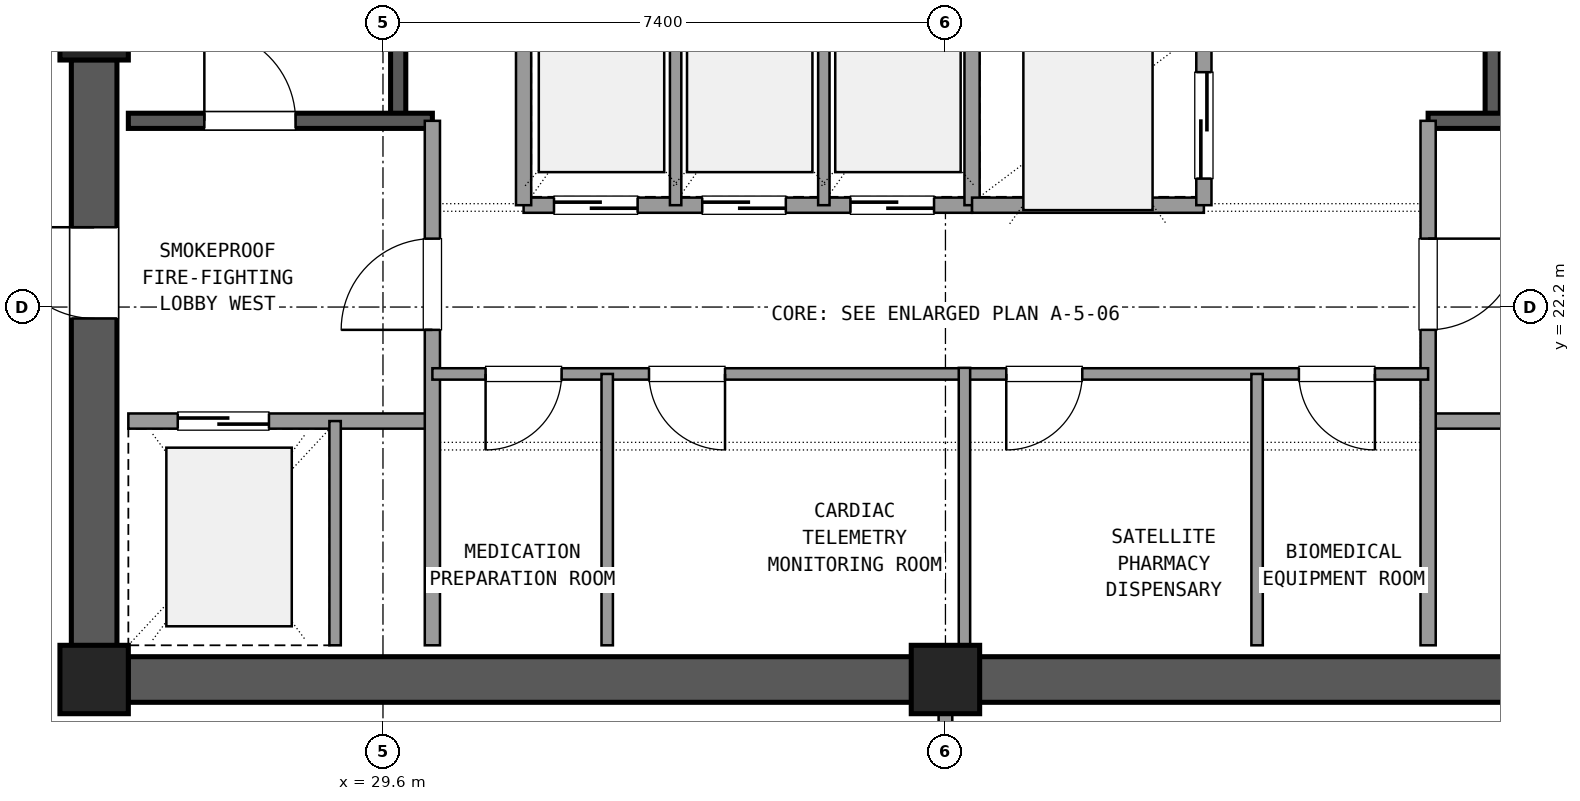
"""IFC4 building model, lengths in metres.
Left out: names, types, materials, properties, quantities, classifications, styles, units other than length and angle.
Written with IfcOpenShell. Run it as: python <this file> out.ifc"""

import sys

from ifc_helpers import new_model, si_unit, direction, frame, frame_2d, origin, origin_2d, place, context, subcontext, project, spatial, rectangle, extrude, element, fill, save


model = new_model("IFC4")
c1 = context("Model", 3, precision=1e-05, world=origin(), true_north=direction((0.0, 1.0)))
c2 = subcontext(c1, "Body", "Model", "MODEL_VIEW")
j1 = project(units=[si_unit("LENGTHUNIT", "METRE"), si_unit("PLANEANGLEUNIT", "RADIAN")], contexts=[c1])
p1 = place(None, origin())
s1 = spatial("IfcSite", under=j1, at=p1, CompositionType="ELEMENT")
p2 = place(p1, origin())
s2 = spatial("IfcBuilding", under=s1, at=p2, CompositionType="ELEMENT")
p3 = place(p2, frame((0.0, 0.0, 253.62)))
s3 = spatial("IfcBuildingStorey", under=s2, at=p3, CompositionType="ELEMENT", Elevation=253.62)
for number, where, z_axis, x_axis in (
    (1, (25.8, 17.3, 0.0), (0.0, 0.0, 1.0), (1.0, 0.0, 0.0)),
    (2, (37.0, 17.3, 0.0), (0.0, 0.0, 1.0), (1.0, 0.0, 0.0)),
    (3, (25.8, 25.9, 0.0), (0.0, 0.0, 1.0), (1.0, 0.0, 0.0)),
):
    element("IfcColumn", number, at=place(p3, frame(where, z_axis=z_axis, x_axis=x_axis)), inside=s3, PredefinedType="COLUMN", context=c2, shape_type="SweptSolid", body=[
        extrude(rectangle(XDim=0.9, YDim=0.9, at=origin_2d()), origin(), (0.0, 0.0, 1.0), 3.6),
    ])
for number, where, z_axis, x_axis in (
    (4, (26.245, 17.3, 0.0), (0.0, 0.0, 1.0), (1.0, 0.0, 0.0)),
    (5, (37.445, 17.3, 0.0), (0.0, 0.0, 1.0), (1.0, 0.0, 0.0)),
):
    element("IfcWall", number, at=place(p3, frame(where, z_axis=z_axis, x_axis=x_axis)), inside=s3, PredefinedType="SHEAR", context=c2, shape_type="SweptSolid", body=[
        extrude(rectangle(XDim=10.31, YDim=0.6, at=frame_2d((5.155, 0.0))), origin(), (0.0, 0.0, 1.0), 3.32),
    ])
p4 = place(p3, frame((25.8, 25.455, 0.0), z_axis=(0.0, 0.0, 1.0), x_axis=(0.0, -1.0, 0.0)))
e6 = element("IfcWall", 6, at=p4, inside=s3, PredefinedType="SHEAR", context=c2, shape_type="SweptSolid", body=[
    extrude(rectangle(XDim=7.71, YDim=0.6, at=frame_2d((3.855, 0.0))), origin(), (0.0, 0.0, 1.0), 3.32),
])
p5 = place(p4, frame((2.205, 0.0, 0.0)))
e7 = element("IfcOpeningElement", 7, at=p5, cuts=e6, PredefinedType="OPENING", context=c2, shape_type="SweptSolid", body=[
    extrude(rectangle(XDim=1.2, YDim=2.15, at=frame_2d((0.6, 1.075))), frame((0.0, 0.31, 0.0), z_axis=(0.0, -1.0, 0.0), x_axis=(1.0, 0.0, 0.0)), (0.0, 0.0, 1.0), 0.62),
])
p6 = place(p3, frame((29.8, 24.65, 0.0), z_axis=(0.0, 0.0, 1.0), x_axis=(0.0, 1.0, 0.0)))
e8 = element("IfcWall", 8, at=p6, inside=s3, PredefinedType="SHEAR", context=c2, shape_type="SweptSolid", body=[
    extrude(rectangle(XDim=9.4, YDim=0.2, at=frame_2d((4.7, 0.0))), origin(), (0.0, 0.0, 1.0), 3.32),
])
p7 = place(p3, frame((26.25, 24.65, 0.0), z_axis=(0.0, 0.0, 1.0), x_axis=(1.0, 0.0, 0.0)))
e9 = element("IfcWall", 9, at=p7, inside=s3, PredefinedType="SHEAR", context=c2, shape_type="SweptSolid", body=[
    extrude(rectangle(XDim=4.0, YDim=0.2, at=frame_2d((2.0, 0.0))), origin(), (0.0, 0.0, 1.0), 3.32),
])
p8 = place(p7, frame((1.0, 0.0, 0.0)))
e10 = element("IfcOpeningElement", 10, at=p8, cuts=e9, PredefinedType="OPENING", context=c2, shape_type="SweptSolid", body=[
    extrude(rectangle(XDim=1.2, YDim=2.15, at=frame_2d((0.6, 1.075))), frame((0.0, 0.11, 0.0), z_axis=(0.0, -1.0, 0.0), x_axis=(1.0, 0.0, 0.0)), (0.0, 0.0, 1.0), 0.22),
])
p9 = place(p3, frame((44.2, 24.65, 0.0), z_axis=(0.0, 0.0, 1.0), x_axis=(0.0, 1.0, 0.0)))
e11 = element("IfcWall", 11, at=p9, inside=s3, PredefinedType="SHEAR", context=c2, shape_type="SweptSolid", body=[
    extrude(rectangle(XDim=9.4, YDim=0.2, at=frame_2d((4.7, 0.0))), origin(), (0.0, 0.0, 1.0), 3.32),
])
p10 = place(p3, frame((43.35, 24.65, 0.0), z_axis=(0.0, 0.0, 1.0), x_axis=(1.0, 0.0, 0.0)))
e12 = element("IfcWall", 12, at=p10, inside=s3, PredefinedType="SHEAR", context=c2, shape_type="SweptSolid", body=[
    extrude(rectangle(XDim=4.4, YDim=0.2, at=frame_2d((2.2, 0.0))), origin(), (0.0, 0.0, 1.0), 3.32),
])
p11 = place(p10, frame((2.0, 0.0, 0.0)))
e13 = element("IfcOpeningElement", 13, at=p11, cuts=e12, PredefinedType="OPENING", context=c2, shape_type="SweptSolid", body=[
    extrude(rectangle(XDim=1.2, YDim=2.15, at=frame_2d((0.6, 1.075))), frame((0.0, 0.11, 0.0), z_axis=(0.0, -1.0, 0.0), x_axis=(1.0, 0.0, 0.0)), (0.0, 0.0, 1.0), 0.22),
])
p12 = place(p3, frame((26.25, 20.7, 0.0), z_axis=(0.0, 0.0, 1.0), x_axis=(1.0, 0.0, 0.0)))
e14 = element("IfcWall", 14, at=p12, inside=s3, PredefinedType="SOLIDWALL", context=c2, shape_type="SweptSolid", body=[
    extrude(rectangle(XDim=4.0, YDim=0.2, at=frame_2d((2.0, 0.0))), origin(), (0.0, 0.0, 1.0), 2.61),
])
p13 = place(p12, frame((0.65, 0.0, 0.0)))
e15 = element("IfcOpeningElement", 15, at=p13, cuts=e14, PredefinedType="OPENING", context=c2, shape_type="SweptSolid", body=[
    extrude(rectangle(XDim=1.2, YDim=2.15, at=frame_2d((0.6, 1.075))), frame((0.0, 0.11, 0.0), z_axis=(0.0, -1.0, 0.0), x_axis=(1.0, 0.0, 0.0)), (0.0, 0.0, 1.0), 0.22),
])
p14 = place(p3, frame((30.25, 17.75, 0.0), z_axis=(0.0, 0.0, 1.0), x_axis=(0.0, 1.0, 0.0)))
e16 = element("IfcWall", 16, at=p14, inside=s3, PredefinedType="SOLIDWALL", context=c2, shape_type="SweptSolid", body=[
    extrude(rectangle(XDim=6.9, YDim=0.2, at=frame_2d((3.45, 0.0))), origin(), (0.0, 0.0, 1.0), 2.61),
])
p15 = place(p14, frame((4.15, 0.0, 0.0)))
e17 = element("IfcOpeningElement", 17, at=p15, cuts=e16, PredefinedType="OPENING", context=c2, shape_type="SweptSolid", body=[
    extrude(rectangle(XDim=1.2, YDim=2.15, at=frame_2d((0.6, 1.075))), frame((0.0, 0.11, 0.0), z_axis=(0.0, -1.0, 0.0), x_axis=(1.0, 0.0, 0.0)), (0.0, 0.0, 1.0), 0.22),
])
p16 = place(p3, frame((28.97, 17.75, 0.0), z_axis=(0.0, 0.0, 1.0), x_axis=(0.0, 1.0, 0.0)))
e18 = element("IfcWall", 18, at=p16, inside=s3, PredefinedType="PARTITIONING", context=c2, shape_type="SweptSolid", body=[
    extrude(rectangle(XDim=2.95, YDim=0.15, at=frame_2d((1.475, 0.0))), origin(), (0.0, 0.0, 1.0), 2.61),
])
p17 = place(p3, frame((43.35, 20.7, 0.0), z_axis=(0.0, 0.0, 1.0), x_axis=(1.0, 0.0, 0.0)))
e19 = element("IfcWall", 19, at=p17, inside=s3, PredefinedType="SOLIDWALL", context=c2, shape_type="SweptSolid", body=[
    extrude(rectangle(XDim=4.4, YDim=0.2, at=frame_2d((2.2, 0.0))), origin(), (0.0, 0.0, 1.0), 2.61),
])
p18 = place(p17, frame((2.35, 0.0, 0.0)))
e20 = element("IfcOpeningElement", 20, at=p18, cuts=e19, PredefinedType="OPENING", context=c2, shape_type="SweptSolid", body=[
    extrude(rectangle(XDim=1.2, YDim=2.15, at=frame_2d((0.6, 1.075))), frame((0.0, 0.11, 0.0), z_axis=(0.0, -1.0, 0.0), x_axis=(1.0, 0.0, 0.0)), (0.0, 0.0, 1.0), 0.22),
])
p19 = place(p3, frame((43.35, 17.75, 0.0), z_axis=(0.0, 0.0, 1.0), x_axis=(0.0, 1.0, 0.0)))
e21 = element("IfcWall", 21, at=p19, inside=s3, PredefinedType="SOLIDWALL", context=c2, shape_type="SweptSolid", body=[
    extrude(rectangle(XDim=6.9, YDim=0.2, at=frame_2d((3.45, 0.0))), origin(), (0.0, 0.0, 1.0), 2.61),
])
p20 = place(p19, frame((4.15, 0.0, 0.0)))
e22 = element("IfcOpeningElement", 22, at=p20, cuts=e21, PredefinedType="OPENING", context=c2, shape_type="SweptSolid", body=[
    extrude(rectangle(XDim=1.2, YDim=2.15, at=frame_2d((0.6, 1.075))), frame((0.0, 0.11, 0.0), z_axis=(0.0, -1.0, 0.0), x_axis=(1.0, 0.0, 0.0)), (0.0, 0.0, 1.0), 0.22),
])
p21 = place(p3, frame((30.25, 21.32, 0.0), z_axis=(0.0, 0.0, 1.0), x_axis=(1.0, 0.0, 0.0)))
e23 = element("IfcWall", 23, at=p21, inside=s3, PredefinedType="PARTITIONING", context=c2, shape_type="SweptSolid", body=[
    extrude(rectangle(XDim=7.0, YDim=0.15, at=frame_2d((3.5, 0.0))), origin(), (0.0, 0.0, 1.0), 2.61),
])
p22 = place(p21, frame((0.7, 0.0, 0.0)))
e24 = element("IfcOpeningElement", 24, at=p22, cuts=e23, PredefinedType="OPENING", context=c2, shape_type="SweptSolid", body=[
    extrude(rectangle(XDim=1.0, YDim=2.15, at=frame_2d((0.5, 1.075))), frame((0.0, 0.085, 0.0), z_axis=(0.0, -1.0, 0.0), x_axis=(1.0, 0.0, 0.0)), (0.0, 0.0, 1.0), 0.17),
])
p23 = place(p21, frame((2.85, 0.0, 0.0)))
e25 = element("IfcOpeningElement", 25, at=p23, cuts=e23, PredefinedType="OPENING", context=c2, shape_type="SweptSolid", body=[
    extrude(rectangle(XDim=1.0, YDim=2.15, at=frame_2d((0.5, 1.075))), frame((0.0, 0.085, 0.0), z_axis=(0.0, -1.0, 0.0), x_axis=(1.0, 0.0, 0.0)), (0.0, 0.0, 1.0), 0.17),
])
p24 = place(p3, frame((32.55, 17.75, 0.0), z_axis=(0.0, 0.0, 1.0), x_axis=(0.0, 1.0, 0.0)))
e26 = element("IfcWall", 26, at=p24, inside=s3, PredefinedType="PARTITIONING", context=c2, shape_type="SweptSolid", body=[
    extrude(rectangle(XDim=3.57, YDim=0.15, at=frame_2d((1.785, 0.0))), origin(), (0.0, 0.0, 1.0), 2.61),
])
p25 = place(p3, frame((37.25, 21.32, 0.0), z_axis=(0.0, 0.0, 1.0), x_axis=(1.0, 0.0, 0.0)))
e27 = element("IfcWall", 27, at=p25, inside=s3, PredefinedType="PARTITIONING", context=c2, shape_type="SweptSolid", body=[
    extrude(rectangle(XDim=6.1, YDim=0.15, at=frame_2d((3.05, 0.0))), origin(), (0.0, 0.0, 1.0), 2.61),
])
p26 = place(p25, frame((0.55, 0.0, 0.0)))
e28 = element("IfcOpeningElement", 28, at=p26, cuts=e27, PredefinedType="OPENING", context=c2, shape_type="SweptSolid", body=[
    extrude(rectangle(XDim=1.0, YDim=2.15, at=frame_2d((0.5, 1.075))), frame((0.0, 0.085, 0.0), z_axis=(0.0, -1.0, 0.0), x_axis=(1.0, 0.0, 0.0)), (0.0, 0.0, 1.0), 0.17),
])
p27 = place(p25, frame((4.4, 0.0, 0.0)))
e29 = element("IfcOpeningElement", 29, at=p27, cuts=e27, PredefinedType="OPENING", context=c2, shape_type="SweptSolid", body=[
    extrude(rectangle(XDim=1.0, YDim=2.15, at=frame_2d((0.5, 1.075))), frame((0.0, 0.085, 0.0), z_axis=(0.0, -1.0, 0.0), x_axis=(1.0, 0.0, 0.0)), (0.0, 0.0, 1.0), 0.17),
])
p28 = place(p3, frame((41.1, 17.75, 0.0), z_axis=(0.0, 0.0, 1.0), x_axis=(0.0, 1.0, 0.0)))
e30 = element("IfcWall", 30, at=p28, inside=s3, PredefinedType="PARTITIONING", context=c2, shape_type="SweptSolid", body=[
    extrude(rectangle(XDim=3.57, YDim=0.15, at=frame_2d((1.785, 0.0))), origin(), (0.0, 0.0, 1.0), 2.61),
])
p29 = place(p3, frame((37.25, 17.75, 0.0), z_axis=(0.0, 0.0, 1.0), x_axis=(0.0, 1.0, 0.0)))
e31 = element("IfcWall", 31, at=p29, inside=s3, PredefinedType="PARTITIONING", context=c2, shape_type="SweptSolid", body=[
    extrude(rectangle(XDim=3.65, YDim=0.15, at=frame_2d((1.825, 0.0))), origin(), (0.0, 0.0, 1.0), 2.61),
])
p30 = place(p3, frame((31.45, 23.54, 0.0), z_axis=(0.0, 0.0, 1.0), x_axis=(1.0, 0.0, 0.0)))
e32 = element("IfcWall", 32, at=p30, inside=s3, PredefinedType="SOLIDWALL", context=c2, shape_type="SweptSolid", body=[
    extrude(rectangle(XDim=5.9, YDim=0.2, at=frame_2d((2.95, 0.0))), origin(), (0.0, 0.0, 1.0), 2.61),
])
p31 = place(p30, frame((0.4, 0.0, 0.0)))
e33 = element("IfcOpeningElement", 33, at=p31, cuts=e32, PredefinedType="OPENING", context=c2, shape_type="SweptSolid", body=[
    extrude(rectangle(XDim=1.1, YDim=2.15, at=frame_2d((0.55, 1.075))), frame((0.0, 0.11, 0.0), z_axis=(0.0, -1.0, 0.0), x_axis=(1.0, 0.0, 0.0)), (0.0, 0.0, 1.0), 0.22),
])
p32 = place(p30, frame((2.35, 0.0, 0.0)))
e34 = element("IfcOpeningElement", 34, at=p32, cuts=e32, PredefinedType="OPENING", context=c2, shape_type="SweptSolid", body=[
    extrude(rectangle(XDim=1.1, YDim=2.15, at=frame_2d((0.55, 1.075))), frame((0.0, 0.11, 0.0), z_axis=(0.0, -1.0, 0.0), x_axis=(1.0, 0.0, 0.0)), (0.0, 0.0, 1.0), 0.22),
])
p33 = place(p30, frame((4.3, 0.0, 0.0)))
e35 = element("IfcOpeningElement", 35, at=p33, cuts=e32, PredefinedType="OPENING", context=c2, shape_type="SweptSolid", body=[
    extrude(rectangle(XDim=1.1, YDim=2.15, at=frame_2d((0.55, 1.075))), frame((0.0, 0.11, 0.0), z_axis=(0.0, -1.0, 0.0), x_axis=(1.0, 0.0, 0.0)), (0.0, 0.0, 1.0), 0.22),
])
p34 = place(p3, frame((31.45, 23.54, 0.0), z_axis=(0.0, 0.0, 1.0), x_axis=(0.0, 1.0, 0.0)))
e36 = element("IfcWall", 36, at=p34, inside=s3, PredefinedType="SOLIDWALL", context=c2, shape_type="SweptSolid", body=[
    extrude(rectangle(XDim=2.81, YDim=0.2, at=frame_2d((1.405, 0.0))), origin(), (0.0, 0.0, 1.0), 2.61),
])
for number, where, z_axis, x_axis in (
    (37, (33.45, 23.54, 0.0), (0.0, 0.0, 1.0), (0.0, 1.0, 0.0)),
    (38, (35.4, 23.54, 0.0), (0.0, 0.0, 1.0), (0.0, 1.0, 0.0)),
):
    element("IfcWall", number, at=place(p3, frame(where, z_axis=z_axis, x_axis=x_axis)), inside=s3, PredefinedType="PARTITIONING", context=c2, shape_type="SweptSolid", body=[
        extrude(rectangle(XDim=2.81, YDim=0.15, at=frame_2d((1.405, 0.0))), origin(), (0.0, 0.0, 1.0), 2.61),
    ])
p35 = place(p3, frame((37.35, 23.54, 0.0), z_axis=(0.0, 0.0, 1.0), x_axis=(0.0, 1.0, 0.0)))
e39 = element("IfcWall", 39, at=p35, inside=s3, PredefinedType="SOLIDWALL", context=c2, shape_type="SweptSolid", body=[
    extrude(rectangle(XDim=6.82, YDim=0.2, at=frame_2d((3.41, 0.0))), origin(), (0.0, 0.0, 1.0), 2.61),
])
p36 = place(p3, frame((37.35, 23.54, 0.0), z_axis=(0.0, 0.0, 1.0), x_axis=(1.0, 0.0, 0.0)))
e40 = element("IfcWall", 40, at=p36, inside=s3, PredefinedType="SOLIDWALL", context=c2, shape_type="SweptSolid", body=[
    extrude(rectangle(XDim=3.05, YDim=0.2, at=frame_2d((1.525, 0.0))), origin(), (0.0, 0.0, 1.0), 2.61),
])
p37 = place(p3, frame((40.4, 23.54, 0.0), z_axis=(0.0, 0.0, 1.0), x_axis=(0.0, 1.0, 0.0)))
e41 = element("IfcWall", 41, at=p37, inside=s3, PredefinedType="SOLIDWALL", context=c2, shape_type="SweptSolid", body=[
    extrude(rectangle(XDim=6.82, YDim=0.2, at=frame_2d((3.41, 0.0))), origin(), (0.0, 0.0, 1.0), 2.61),
])
p38 = place(p37, frame((0.35, 0.0, 0.0)))
e42 = element("IfcOpeningElement", 42, at=p38, cuts=e41, PredefinedType="OPENING", context=c2, shape_type="SweptSolid", body=[
    extrude(rectangle(XDim=1.4, YDim=2.2, at=frame_2d((0.7, 1.1))), frame((0.0, 0.11, 0.0), z_axis=(0.0, -1.0, 0.0), x_axis=(1.0, 0.0, 0.0)), (0.0, 0.0, 1.0), 0.22),
])
p39 = place(p37, frame((2.65, 0.0, 0.0)))
e43 = element("IfcOpeningElement", 43, at=p39, cuts=e41, PredefinedType="OPENING", context=c2, shape_type="SweptSolid", body=[
    extrude(rectangle(XDim=1.4, YDim=2.2, at=frame_2d((0.7, 1.1))), frame((0.0, 0.11, 0.0), z_axis=(0.0, -1.0, 0.0), x_axis=(1.0, 0.0, 0.0)), (0.0, 0.0, 1.0), 0.22),
])
p40 = place(p37, frame((4.85, 0.0, 0.0)))
e44 = element("IfcOpeningElement", 44, at=p40, cuts=e41, PredefinedType="OPENING", context=c2, shape_type="SweptSolid", body=[
    extrude(rectangle(XDim=1.4, YDim=2.2, at=frame_2d((0.7, 1.1))), frame((0.0, 0.11, 0.0), z_axis=(0.0, -1.0, 0.0), x_axis=(1.0, 0.0, 0.0)), (0.0, 0.0, 1.0), 0.22),
])
p41 = place(p3, frame((37.0, 14.15, 0.0), z_axis=(0.0, 0.0, 1.0), x_axis=(0.0, 1.0, 0.0)))
e45 = element("IfcWall", 45, at=p41, inside=s3, PredefinedType="PARTITIONING", context=c2, shape_type="SweptSolid", body=[
    extrude(rectangle(XDim=2.7, YDim=0.18, at=frame_2d((1.35, 0.0))), origin(), (0.0, 0.0, 1.0), 2.61),
])
p42 = place(p41, frame((0.35, 0.0, 0.0)))
e46 = element("IfcOpeningElement", 46, at=p42, cuts=e45, PredefinedType="OPENING", context=c2, shape_type="SweptSolid", body=[
    extrude(rectangle(XDim=2.0, YDim=2.2, at=frame_2d((1.0, 1.1))), frame((0.0, 0.1, 0.0), z_axis=(0.0, -1.0, 0.0), x_axis=(1.0, 0.0, 0.0)), (0.0, 0.0, 1.0), 0.2),
])
p43 = place(p8, origin())
e47 = element("IfcDoor", 47, at=p43, inside=s3, OperationType="SINGLE_SWING_LEFT", PredefinedType="DOOR", context=c2, shape_type="SweptSolid", body=[
    extrude(rectangle(XDim=1.2, YDim=2.15, at=frame_2d((0.6, 1.075))), frame((0.0, 0.025, 0.0), z_axis=(0.0, -1.0, 0.0), x_axis=(1.0, 0.0, 0.0)), (0.0, 0.0, 1.0), 0.05),
])
fill(e10, e47)
p44 = place(p13, origin())
e48 = element("IfcDoor", 48, at=p44, inside=s3, OperationType="SLIDING_TO_LEFT", PredefinedType="DOOR", context=c2, shape_type="SweptSolid", body=[
    extrude(rectangle(XDim=1.2, YDim=2.15, at=frame_2d((0.6, 1.075))), frame((0.0, 0.025, 0.0), z_axis=(0.0, -1.0, 0.0), x_axis=(1.0, 0.0, 0.0)), (0.0, 0.0, 1.0), 0.05),
])
fill(e15, e48)
p45 = place(p15, origin())
e49 = element("IfcDoor", 49, at=p45, inside=s3, OperationType="SINGLE_SWING_LEFT", PredefinedType="DOOR", context=c2, shape_type="SweptSolid", body=[
    extrude(rectangle(XDim=1.2, YDim=2.15, at=frame_2d((0.6, 1.075))), frame((0.0, 0.025, 0.0), z_axis=(0.0, -1.0, 0.0), x_axis=(1.0, 0.0, 0.0)), (0.0, 0.0, 1.0), 0.05),
])
fill(e17, e49)
p46 = place(p20, frame((1.2, 0.0, 0.0), z_axis=(0.0, 0.0, 1.0), x_axis=(-1.0, 0.0, 0.0)))
e50 = element("IfcDoor", 50, at=p46, inside=s3, OperationType="SINGLE_SWING_RIGHT", PredefinedType="DOOR", context=c2, shape_type="SweptSolid", body=[
    extrude(rectangle(XDim=1.2, YDim=2.15, at=frame_2d((0.6, 1.075))), frame((0.0, 0.025, 0.0), z_axis=(0.0, -1.0, 0.0), x_axis=(1.0, 0.0, 0.0)), (0.0, 0.0, 1.0), 0.05),
])
fill(e22, e50)
p47 = place(p5, frame((1.2, 0.0, 0.0), z_axis=(0.0, 0.0, 1.0), x_axis=(-1.0, 0.0, 0.0)))
e51 = element("IfcDoor", 51, at=p47, inside=s3, OperationType="SINGLE_SWING_LEFT", PredefinedType="DOOR", context=c2, shape_type="SweptSolid", body=[
    extrude(rectangle(XDim=1.2, YDim=2.15, at=frame_2d((0.6, 1.075))), frame((0.0, 0.025, 0.0), z_axis=(0.0, -1.0, 0.0), x_axis=(1.0, 0.0, 0.0)), (0.0, 0.0, 1.0), 0.05),
])
fill(e7, e51)
p48 = place(p22, frame((1.0, 0.0, 0.0), z_axis=(0.0, 0.0, 1.0), x_axis=(-1.0, 0.0, 0.0)))
e52 = element("IfcDoor", 52, at=p48, inside=s3, OperationType="SINGLE_SWING_LEFT", PredefinedType="DOOR", context=c2, shape_type="SweptSolid", body=[
    extrude(rectangle(XDim=1.0, YDim=2.15, at=frame_2d((0.5, 1.075))), frame((0.0, 0.025, 0.0), z_axis=(0.0, -1.0, 0.0), x_axis=(1.0, 0.0, 0.0)), (0.0, 0.0, 1.0), 0.05),
])
fill(e24, e52)
p49 = place(p23, frame((1.0, 0.0, 0.0), z_axis=(0.0, 0.0, 1.0), x_axis=(-1.0, 0.0, 0.0)))
e53 = element("IfcDoor", 53, at=p49, inside=s3, OperationType="SINGLE_SWING_RIGHT", PredefinedType="DOOR", context=c2, shape_type="SweptSolid", body=[
    extrude(rectangle(XDim=1.0, YDim=2.15, at=frame_2d((0.5, 1.075))), frame((0.0, 0.025, 0.0), z_axis=(0.0, -1.0, 0.0), x_axis=(1.0, 0.0, 0.0)), (0.0, 0.0, 1.0), 0.05),
])
fill(e25, e53)
p50 = place(p26, frame((1.0, 0.0, 0.0), z_axis=(0.0, 0.0, 1.0), x_axis=(-1.0, 0.0, 0.0)))
e54 = element("IfcDoor", 54, at=p50, inside=s3, OperationType="SINGLE_SWING_LEFT", PredefinedType="DOOR", context=c2, shape_type="SweptSolid", body=[
    extrude(rectangle(XDim=1.0, YDim=2.15, at=frame_2d((0.5, 1.075))), frame((0.0, 0.025, 0.0), z_axis=(0.0, -1.0, 0.0), x_axis=(1.0, 0.0, 0.0)), (0.0, 0.0, 1.0), 0.05),
])
fill(e28, e54)
p51 = place(p27, frame((1.0, 0.0, 0.0), z_axis=(0.0, 0.0, 1.0), x_axis=(-1.0, 0.0, 0.0)))
e55 = element("IfcDoor", 55, at=p51, inside=s3, OperationType="SINGLE_SWING_RIGHT", PredefinedType="DOOR", context=c2, shape_type="SweptSolid", body=[
    extrude(rectangle(XDim=1.0, YDim=2.15, at=frame_2d((0.5, 1.075))), frame((0.0, 0.025, 0.0), z_axis=(0.0, -1.0, 0.0), x_axis=(1.0, 0.0, 0.0)), (0.0, 0.0, 1.0), 0.05),
])
fill(e29, e55)
p52 = place(p31, origin())
e56 = element("IfcDoor", 56, at=p52, inside=s3, OperationType="SLIDING_TO_RIGHT", PredefinedType="DOOR", context=c2, shape_type="SweptSolid", body=[
    extrude(rectangle(XDim=1.1, YDim=2.15, at=frame_2d((0.55, 1.075))), frame((0.0, 0.025, 0.0), z_axis=(0.0, -1.0, 0.0), x_axis=(1.0, 0.0, 0.0)), (0.0, 0.0, 1.0), 0.05),
])
fill(e33, e56)
p53 = place(p32, origin())
e57 = element("IfcDoor", 57, at=p53, inside=s3, OperationType="SLIDING_TO_RIGHT", PredefinedType="DOOR", context=c2, shape_type="SweptSolid", body=[
    extrude(rectangle(XDim=1.1, YDim=2.15, at=frame_2d((0.55, 1.075))), frame((0.0, 0.025, 0.0), z_axis=(0.0, -1.0, 0.0), x_axis=(1.0, 0.0, 0.0)), (0.0, 0.0, 1.0), 0.05),
])
fill(e34, e57)
p54 = place(p33, origin())
e58 = element("IfcDoor", 58, at=p54, inside=s3, OperationType="SLIDING_TO_RIGHT", PredefinedType="DOOR", context=c2, shape_type="SweptSolid", body=[
    extrude(rectangle(XDim=1.1, YDim=2.15, at=frame_2d((0.55, 1.075))), frame((0.0, 0.025, 0.0), z_axis=(0.0, -1.0, 0.0), x_axis=(1.0, 0.0, 0.0)), (0.0, 0.0, 1.0), 0.05),
])
fill(e35, e58)
p55 = place(p38, origin())
e59 = element("IfcDoor", 59, at=p55, inside=s3, OperationType="SLIDING_TO_LEFT", PredefinedType="DOOR", context=c2, shape_type="SweptSolid", body=[
    extrude(rectangle(XDim=1.4, YDim=2.2, at=frame_2d((0.7, 1.1))), frame((0.0, 0.025, 0.0), z_axis=(0.0, -1.0, 0.0), x_axis=(1.0, 0.0, 0.0)), (0.0, 0.0, 1.0), 0.05),
])
fill(e42, e59)
save(model, sys.argv[1])
